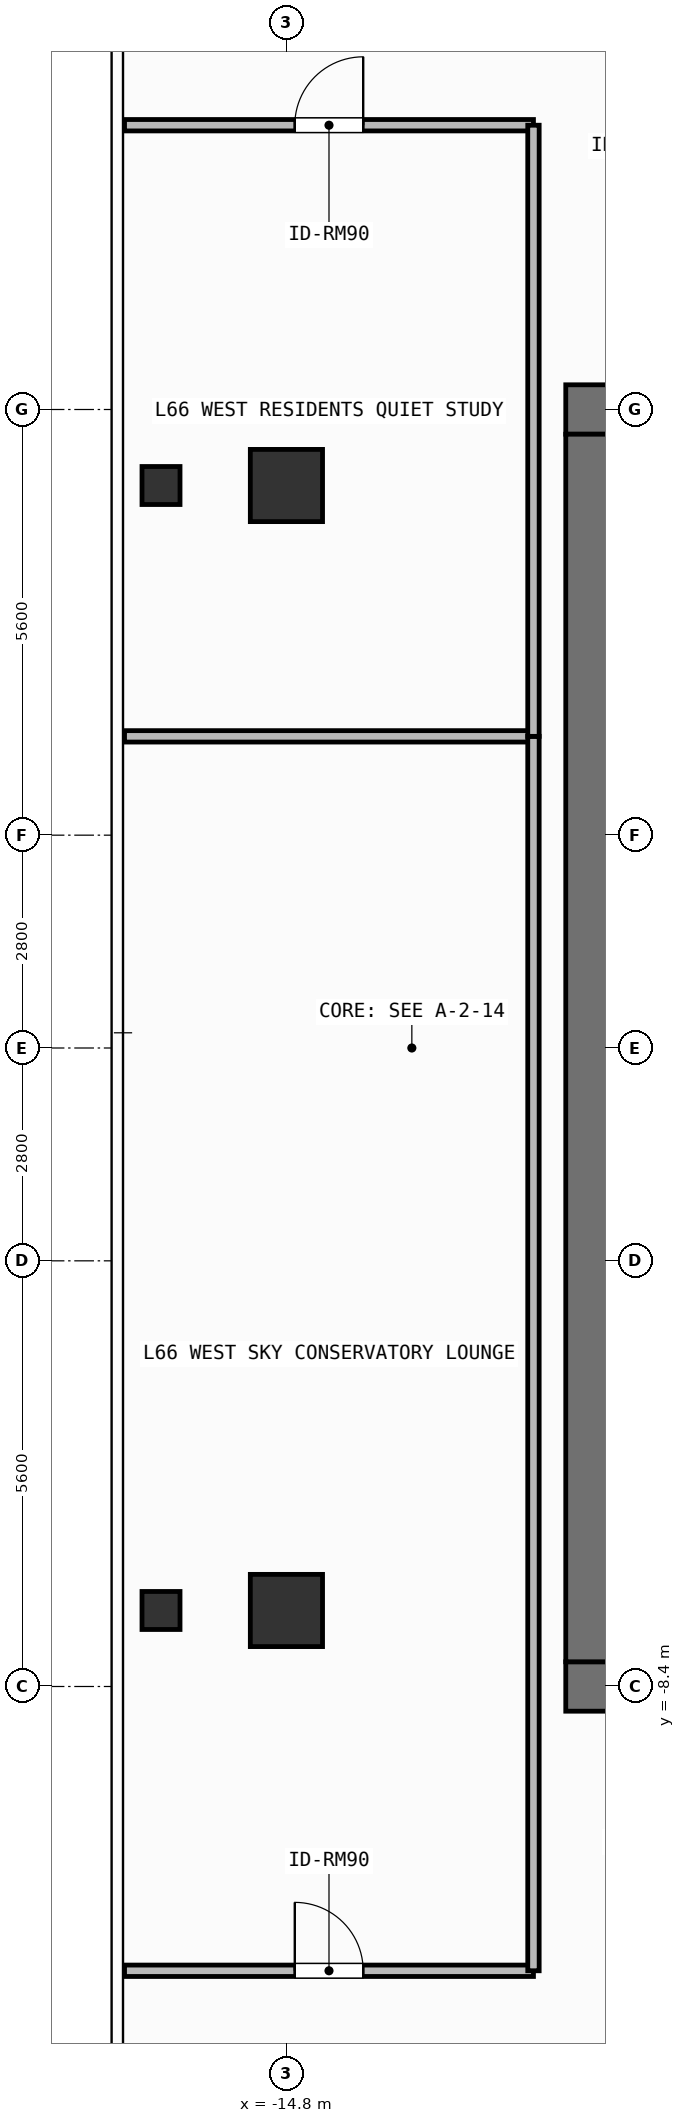
"""IFC4 building model, lengths in metres.
Left out: names, types, materials, properties, quantities, classifications, styles, units other than length and angle.
Written with IfcOpenShell. Run it as: python <this file> out.ifc"""

import sys

from ifc_helpers import new_model, si_unit, direction, frame, frame_2d, origin, origin_2d, place, context, subcontext, project, spatial, rectangle, hollow_rectangle, extrude, element, fill, save


model = new_model("IFC4")
c1 = context("Model", 3, precision=1e-05, world=origin(), true_north=direction((0.0, 1.0)))
c2 = subcontext(c1, "Body", "Model", "MODEL_VIEW")
j1 = project(units=[si_unit("LENGTHUNIT", "METRE"), si_unit("PLANEANGLEUNIT", "RADIAN")], contexts=[c1])
p1 = place(None, origin())
s1 = spatial("IfcSite", under=j1, at=p1, CompositionType="ELEMENT")
p2 = place(p1, origin())
s2 = spatial("IfcBuilding", under=s1, at=p2, CompositionType="ELEMENT")
p3 = place(p2, frame((0.0, 0.0, 270.3)))
s3 = spatial("IfcBuildingStorey", under=s2, at=p3, CompositionType="ELEMENT", Elevation=270.3)
for number, where, z_axis, x_axis in (
    (1, (-11.125, -8.4, 0.0), (0.0, 0.0, 1.0), (1.0, 0.0, 0.0)),
    (2, (-11.125, 8.4, 0.0), (0.0, 0.0, 1.0), (1.0, 0.0, 0.0)),
):
    element("IfcWall", number, at=place(p3, frame(where, z_axis=z_axis, x_axis=x_axis)), inside=s3, PredefinedType="SHEAR", context=c2, shape_type="SweptSolid", body=[
        extrude(rectangle(XDim=1.425, YDim=0.65, at=frame_2d((0.712, 0.0))), origin(), (0.0, 0.0, 1.0), 3.9),
    ])
p4 = place(p3, frame((-10.8, -8.075, 0.0), z_axis=(0.0, 0.0, 1.0), x_axis=(0.0, 1.0, 0.0)))
e3 = element("IfcWall", 3, at=p4, inside=s3, PredefinedType="SHEAR", context=c2, shape_type="SweptSolid", body=[
    extrude(rectangle(XDim=16.15, YDim=0.65, at=frame_2d((8.075, 0.0))), origin(), (0.0, 0.0, 1.0), 3.9),
])
for number, where, z_axis, x_axis in (
    (4, (-14.8, -7.4, 0.0), (0.0, 0.0, 1.0), (1.0, 0.0, 0.0)),
    (5, (-14.8, 7.4, 0.0), (0.0, 0.0, 1.0), (1.0, 0.0, 0.0)),
):
    element("IfcColumn", number, at=place(p3, frame(where, z_axis=z_axis, x_axis=x_axis)), inside=s3, PredefinedType="COLUMN", context=c2, shape_type="SweptSolid", body=[
        extrude(rectangle(XDim=0.95, YDim=0.95, at=origin_2d()), origin(), (0.0, 0.0, 1.0), 3.9),
    ])
for number, where, z_axis, x_axis in (
    (6, (-16.45, -7.4, 0.0), (0.0, 0.0, 1.0), (1.0, 0.0, 0.0)),
    (7, (-16.45, 7.4, 0.0), (0.0, 0.0, 1.0), (1.0, 0.0, 0.0)),
):
    element("IfcColumn", number, at=place(p3, frame(where, z_axis=z_axis, x_axis=x_axis)), inside=s3, PredefinedType="COLUMN", context=c2, shape_type="SweptSolid", body=[
        extrude(hollow_rectangle(XDim=0.5, YDim=0.5, WallThickness=0.025, at=origin_2d()), origin(), (0.0, 0.0, 1.0), 3.9),
    ])
p5 = place(p3, frame((-16.93, -12.14, 0.0), z_axis=(0.0, 0.0, 1.0), x_axis=(1.0, 0.0, 0.0)))
e8 = element("IfcWall", 8, at=p5, inside=s3, PredefinedType="PARTITIONING", context=c2, shape_type="SweptSolid", body=[
    extrude(rectangle(XDim=5.38, YDim=0.15, at=frame_2d((2.69, 0.0))), origin(), (0.0, 0.0, 1.0), 3.68),
])
p6 = place(p5, frame((2.24, 0.0, 0.0)))
e9 = element("IfcOpeningElement", 9, at=p6, cuts=e8, PredefinedType="OPENING", context=c2, shape_type="SweptSolid", body=[
    extrude(rectangle(XDim=0.9, YDim=2.1, at=frame_2d((0.45, 1.05))), frame((0.0, 0.085, 0.0), z_axis=(0.0, -1.0, 0.0), x_axis=(1.0, 0.0, 0.0)), (0.0, 0.0, 1.0), 0.17),
])
p7 = place(p3, frame((-16.93, 12.14, 0.0), z_axis=(0.0, 0.0, 1.0), x_axis=(1.0, 0.0, 0.0)))
e10 = element("IfcWall", 10, at=p7, inside=s3, PredefinedType="PARTITIONING", context=c2, shape_type="SweptSolid", body=[
    extrude(rectangle(XDim=5.38, YDim=0.15, at=frame_2d((2.69, 0.0))), origin(), (0.0, 0.0, 1.0), 3.68),
])
p8 = place(p7, frame((2.24, 0.0, 0.0)))
e11 = element("IfcOpeningElement", 11, at=p8, cuts=e10, PredefinedType="OPENING", context=c2, shape_type="SweptSolid", body=[
    extrude(rectangle(XDim=0.9, YDim=2.1, at=frame_2d((0.45, 1.05))), frame((0.0, 0.085, 0.0), z_axis=(0.0, -1.0, 0.0), x_axis=(1.0, 0.0, 0.0)), (0.0, 0.0, 1.0), 0.17),
])
p9 = place(p3, frame((-16.93, 4.1, 0.0), z_axis=(0.0, 0.0, 1.0), x_axis=(1.0, 0.0, 0.0)))
e12 = element("IfcWall", 12, at=p9, inside=s3, PredefinedType="PARTITIONING", context=c2, shape_type="SweptSolid", body=[
    extrude(rectangle(XDim=5.38, YDim=0.15, at=frame_2d((2.69, 0.0))), origin(), (0.0, 0.0, 1.0), 3.68),
])
p10 = place(p3, frame((-11.55, -12.14, 0.0), z_axis=(0.0, 0.0, 1.0), x_axis=(0.0, 1.0, 0.0)))
e13 = element("IfcWall", 13, at=p10, inside=s3, PredefinedType="PARTITIONING", context=c2, shape_type="SweptSolid", body=[
    extrude(rectangle(XDim=16.24, YDim=0.15, at=frame_2d((8.12, 0.0))), origin(), (0.0, 0.0, 1.0), 3.68),
])
p11 = place(p3, frame((-11.55, 4.1, 0.0), z_axis=(0.0, 0.0, 1.0), x_axis=(0.0, 1.0, 0.0)))
e14 = element("IfcWall", 14, at=p11, inside=s3, PredefinedType="PARTITIONING", context=c2, shape_type="SweptSolid", body=[
    extrude(rectangle(XDim=8.04, YDim=0.15, at=frame_2d((4.02, 0.0))), origin(), (0.0, 0.0, 1.0), 3.68),
])
p12 = place(p6, origin())
e15 = element("IfcDoor", 15, at=p12, inside=s3, OperationType="SINGLE_SWING_LEFT", PredefinedType="DOOR", context=c2, shape_type="SweptSolid", body=[
    extrude(rectangle(XDim=0.9, YDim=2.1, at=frame_2d((0.45, 1.05))), frame((0.0, 0.025, 0.0), z_axis=(0.0, -1.0, 0.0), x_axis=(1.0, 0.0, 0.0)), (0.0, 0.0, 1.0), 0.05),
])
fill(e9, e15)
p13 = place(p8, origin())
e16 = element("IfcDoor", 16, at=p13, inside=s3, OperationType="SINGLE_SWING_RIGHT", PredefinedType="DOOR", context=c2, shape_type="SweptSolid", body=[
    extrude(rectangle(XDim=0.9, YDim=2.1, at=frame_2d((0.45, 1.05))), frame((0.0, 0.025, 0.0), z_axis=(0.0, -1.0, 0.0), x_axis=(1.0, 0.0, 0.0)), (0.0, 0.0, 1.0), 0.05),
])
fill(e11, e16)
save(model, sys.argv[1])
